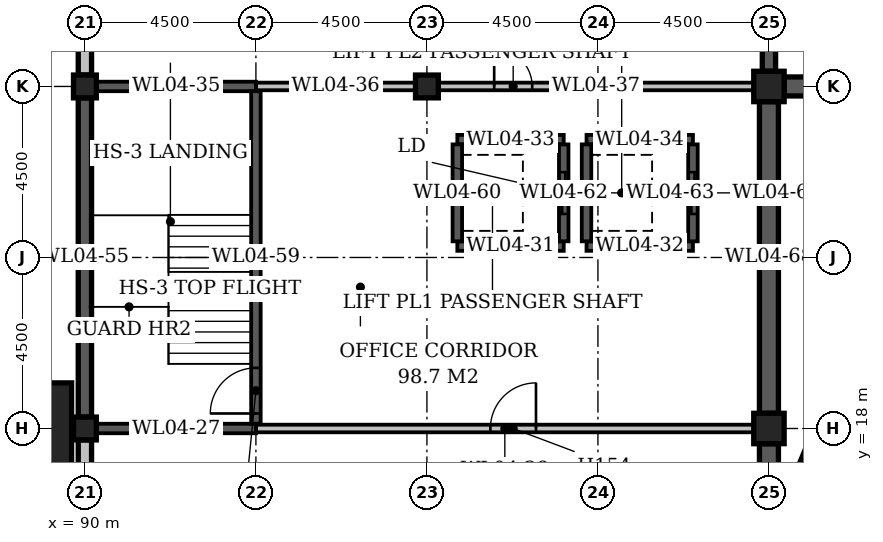
"""IFC4 building model, lengths in metres.
Left out: names, types, materials, properties, quantities, classifications, styles, units other than length and angle.
Written with IfcOpenShell. Run it as: python <this file> out.ifc"""

import sys

from ifc_helpers import new_model, si_unit, direction, frame, frame_2d, origin, origin_2d, place, context, subcontext, project, spatial, rectangle, extrude, element, fill, save


model = new_model("IFC4")
c1 = context("Model", 3, precision=1e-05, world=origin(), true_north=direction((0.0, 1.0)))
c2 = subcontext(c1, "Body", "Model", "MODEL_VIEW")
j1 = project(units=[si_unit("LENGTHUNIT", "METRE"), si_unit("PLANEANGLEUNIT", "RADIAN")], contexts=[c1])
p1 = place(None, origin())
s1 = spatial("IfcSite", under=j1, at=p1, CompositionType="ELEMENT")
p2 = place(p1, origin())
s2 = spatial("IfcBuilding", under=s1, at=p2, CompositionType="ELEMENT")
p3 = place(p2, frame((0.0, 0.0, 24.0)))
s3 = spatial("IfcBuildingStorey", under=s2, at=p3, CompositionType="ELEMENT", Elevation=24.0)
for number, where, z_axis, x_axis in (
    (1, (90.0, 18.0, 0.0), (0.0, 0.0, 1.0), (1.0, 0.0, 0.0)),
    (2, (90.0, 27.0, 0.0), (0.0, 0.0, 1.0), (1.0, 0.0, 0.0)),
    (3, (99.0, 27.0, 0.0), (0.0, 0.0, 1.0), (1.0, 0.0, 0.0)),
):
    element("IfcColumn", number, at=place(p3, frame(where, z_axis=z_axis, x_axis=x_axis)), inside=s3, PredefinedType="COLUMN", context=c2, shape_type="SweptSolid", body=[
        extrude(rectangle(XDim=0.6, YDim=0.6, at=origin_2d()), origin(), (0.0, 0.0, 1.0), 4.7),
    ])
for number, where, z_axis, x_axis in (
    (4, (108.0, 18.0, -0.3), (0.0, 0.0, 1.0), (1.0, 0.0, 0.0)),
    (5, (108.0, 27.0, -0.3), (0.0, 0.0, 1.0), (1.0, 0.0, 0.0)),
):
    element("IfcColumn", number, at=place(p3, frame(where, z_axis=z_axis, x_axis=x_axis)), inside=s3, PredefinedType="COLUMN", context=c2, shape_type="SweptSolid", body=[
        extrude(rectangle(XDim=0.8, YDim=0.8, at=origin_2d()), origin(), (0.0, 0.0, 1.0), 5.0),
    ])
p4 = place(p3, frame((90.3, 18.0, 0.0), z_axis=(0.0, 0.0, 1.0), x_axis=(1.0, 0.0, 0.0)))
e6 = element("IfcWall", 6, at=p4, inside=s3, PredefinedType="STANDARD", context=c2, shape_type="SweptSolid", body=[
    extrude(rectangle(XDim=4.2, YDim=0.25, at=frame_2d((2.1, 0.0))), origin(), (0.0, 0.0, 1.0), 4.7),
])
p5 = place(p3, frame((94.5, 18.0, 0.0), z_axis=(0.0, 0.0, 1.0), x_axis=(1.0, 0.0, 0.0)))
e7 = element("IfcWall", 7, at=p5, inside=s3, PredefinedType="STANDARD", context=c2, shape_type="SweptSolid", body=[
    extrude(rectangle(XDim=13.1, YDim=0.2, at=frame_2d((6.55, 0.0))), origin(), (0.0, 0.0, 1.0), 3.3),
])
p6 = place(p5, frame((6.17, 0.0, 0.0)))
e8 = element("IfcOpeningElement", 8, at=p6, cuts=e7, PredefinedType="OPENING", context=c2, shape_type="SweptSolid", body=[
    extrude(rectangle(XDim=1.2, YDim=2.1, at=frame_2d((0.6, 1.05))), frame((0.0, 0.112, 0.0), z_axis=(0.0, -1.0, 0.0), x_axis=(1.0, 0.0, 0.0)), (0.0, 0.0, 1.0), 0.224),
])
for number, where, z_axis, x_axis in (
    (9, (99.8, 22.8, 0.0), (0.0, 0.0, 1.0), (1.0, 0.0, 0.0)),
    (10, (103.2, 22.8, 0.0), (0.0, 0.0, 1.0), (1.0, 0.0, 0.0)),
    (11, (99.8, 25.6, 0.0), (0.0, 0.0, 1.0), (1.0, 0.0, 0.0)),
    (12, (103.2, 25.6, 0.0), (0.0, 0.0, 1.0), (1.0, 0.0, 0.0)),
):
    element("IfcWall", number, at=place(p3, frame(where, z_axis=z_axis, x_axis=x_axis)), inside=s3, PredefinedType="STANDARD", context=c2, shape_type="SweptSolid", body=[
        extrude(rectangle(XDim=2.8, YDim=0.25, at=frame_2d((1.4, 0.0))), origin(), (0.0, 0.0, 1.0), 4.7),
    ])
p7 = place(p3, frame((90.3, 27.0, 0.0), z_axis=(0.0, 0.0, 1.0), x_axis=(1.0, 0.0, 0.0)))
e13 = element("IfcWall", 13, at=p7, inside=s3, PredefinedType="STANDARD", context=c2, shape_type="SweptSolid", body=[
    extrude(rectangle(XDim=4.2, YDim=0.25, at=frame_2d((2.1, 0.0))), origin(), (0.0, 0.0, 1.0), 4.7),
])
p8 = place(p3, frame((94.5, 27.0, 0.0), z_axis=(0.0, 0.0, 1.0), x_axis=(1.0, 0.0, 0.0)))
e14 = element("IfcWall", 14, at=p8, inside=s3, PredefinedType="STANDARD", context=c2, shape_type="SweptSolid", body=[
    extrude(rectangle(XDim=4.2, YDim=0.2, at=frame_2d((2.1, 0.0))), origin(), (0.0, 0.0, 1.0), 4.7),
])
p9 = place(p3, frame((99.3, 27.0, 0.0), z_axis=(0.0, 0.0, 1.0), x_axis=(1.0, 0.0, 0.0)))
e15 = element("IfcWall", 15, at=p9, inside=s3, PredefinedType="STANDARD", context=c2, shape_type="SweptSolid", body=[
    extrude(rectangle(XDim=8.3, YDim=0.2, at=frame_2d((4.15, 0.0))), origin(), (0.0, 0.0, 1.0), 4.7),
])
p10 = place(p9, frame((1.47, 0.0, 0.0)))
e16 = element("IfcOpeningElement", 16, at=p10, cuts=e15, PredefinedType="OPENING", context=c2, shape_type="SweptSolid", body=[
    extrude(rectangle(XDim=1.0, YDim=2.1, at=frame_2d((0.5, 1.05))), frame((0.0, 0.112, 0.0), z_axis=(0.0, -1.0, 0.0), x_axis=(1.0, 0.0, 0.0)), (0.0, 0.0, 1.0), 0.224),
])
p11 = place(p3, frame((108.4, 27.0, 0.0), z_axis=(0.0, 0.0, 1.0), x_axis=(1.0, 0.0, 0.0)))
e17 = element("IfcWall", 17, at=p11, inside=s3, PredefinedType="STANDARD", context=c2, shape_type="SweptSolid", body=[
    extrude(rectangle(XDim=26.2, YDim=0.5, at=frame_2d((13.1, 0.0))), origin(), (0.0, 0.0, 1.0), 6.0),
])
p12 = place(p3, frame((90.0, 9.3, 0.0), z_axis=(0.0, 0.0, 1.0), x_axis=(0.0, 1.0, 0.0)))
e18 = element("IfcWall", 18, at=p12, inside=s3, PredefinedType="STANDARD", context=c2, shape_type="SweptSolid", body=[
    extrude(rectangle(XDim=8.4, YDim=0.35, at=frame_2d((4.2, 0.0))), origin(), (0.0, 0.0, 1.0), 4.1),
])
p13 = place(p12, frame((1.35, 0.0, 1.0)))
e19 = element("IfcOpeningElement", 19, at=p13, cuts=e18, PredefinedType="OPENING", context=c2, shape_type="SweptSolid", body=[
    extrude(rectangle(XDim=1.5, YDim=2.4, at=frame_2d((0.75, 1.2))), frame((0.0, 0.187, 0.0), z_axis=(0.0, -1.0, 0.0), x_axis=(1.0, 0.0, 0.0)), (0.0, 0.0, 1.0), 0.374),
])
p14 = place(p12, frame((5.55, 0.0, 1.0)))
e20 = element("IfcOpeningElement", 20, at=p14, cuts=e18, PredefinedType="OPENING", context=c2, shape_type="SweptSolid", body=[
    extrude(rectangle(XDim=1.5, YDim=2.4, at=frame_2d((0.75, 1.2))), frame((0.0, 0.187, 0.0), z_axis=(0.0, -1.0, 0.0), x_axis=(1.0, 0.0, 0.0)), (0.0, 0.0, 1.0), 0.374),
])
p15 = place(p3, frame((90.0, 18.3, 0.0), z_axis=(0.0, 0.0, 1.0), x_axis=(0.0, 1.0, 0.0)))
e21 = element("IfcWall", 21, at=p15, inside=s3, PredefinedType="STANDARD", context=c2, shape_type="SweptSolid", body=[
    extrude(rectangle(XDim=8.4, YDim=0.35, at=frame_2d((4.2, 0.0))), origin(), (0.0, 0.0, 1.0), 4.1),
])
p16 = place(p3, frame((90.0, 27.3, 0.0), z_axis=(0.0, 0.0, 1.0), x_axis=(0.0, 1.0, 0.0)))
e22 = element("IfcWall", 22, at=p16, inside=s3, PredefinedType="STANDARD", context=c2, shape_type="SweptSolid", body=[
    extrude(rectangle(XDim=8.4, YDim=0.35, at=frame_2d((4.2, 0.0))), origin(), (0.0, 0.0, 1.0), 4.1),
])
p17 = place(p16, frame((1.35, 0.0, 1.0)))
e23 = element("IfcOpeningElement", 23, at=p17, cuts=e22, PredefinedType="OPENING", context=c2, shape_type="SweptSolid", body=[
    extrude(rectangle(XDim=1.5, YDim=2.4, at=frame_2d((0.75, 1.2))), frame((0.0, 0.187, 0.0), z_axis=(0.0, -1.0, 0.0), x_axis=(1.0, 0.0, 0.0)), (0.0, 0.0, 1.0), 0.374),
])
p18 = place(p16, frame((5.55, 0.0, 1.0)))
e24 = element("IfcOpeningElement", 24, at=p18, cuts=e22, PredefinedType="OPENING", context=c2, shape_type="SweptSolid", body=[
    extrude(rectangle(XDim=1.5, YDim=2.4, at=frame_2d((0.75, 1.2))), frame((0.0, 0.187, 0.0), z_axis=(0.0, -1.0, 0.0), x_axis=(1.0, 0.0, 0.0)), (0.0, 0.0, 1.0), 0.374),
])
p19 = place(p3, frame((94.5, 18.125, 0.0), z_axis=(0.0, 0.0, 1.0), x_axis=(0.0, 1.0, 0.0)))
e25 = element("IfcWall", 25, at=p19, inside=s3, PredefinedType="STANDARD", context=c2, shape_type="SweptSolid", body=[
    extrude(rectangle(XDim=8.75, YDim=0.25, at=frame_2d((4.375, 0.0))), origin(), (0.0, 0.0, 1.0), 4.7),
])
p20 = place(p19, frame((0.27, 0.0, 0.0)))
e26 = element("IfcOpeningElement", 26, at=p20, cuts=e25, PredefinedType="OPENING", context=c2, shape_type="SweptSolid", body=[
    extrude(rectangle(XDim=1.2, YDim=2.1, at=frame_2d((0.6, 1.05))), frame((0.0, 0.137, 0.0), z_axis=(0.0, -1.0, 0.0), x_axis=(1.0, 0.0, 0.0)), (0.0, 0.0, 1.0), 0.274),
])
p21 = place(p3, frame((99.8, 22.925, 0.0), z_axis=(0.0, 0.0, 1.0), x_axis=(0.0, 1.0, 0.0)))
e27 = element("IfcWall", 27, at=p21, inside=s3, PredefinedType="STANDARD", context=c2, shape_type="SweptSolid", body=[
    extrude(rectangle(XDim=2.55, YDim=0.25, at=frame_2d((1.275, 0.0))), origin(), (0.0, 0.0, 1.0), 4.7),
])
p22 = place(p3, frame((102.6, 22.925, 0.0), z_axis=(0.0, 0.0, 1.0), x_axis=(0.0, 1.0, 0.0)))
e28 = element("IfcWall", 28, at=p22, inside=s3, PredefinedType="STANDARD", context=c2, shape_type="SweptSolid", body=[
    extrude(rectangle(XDim=2.55, YDim=0.25, at=frame_2d((1.275, 0.0))), origin(), (0.0, 0.0, 1.0), 4.7),
])
p23 = place(p22, frame((0.72, 0.0, 0.0)))
e29 = element("IfcOpeningElement", 29, at=p23, cuts=e28, PredefinedType="OPENING", context=c2, shape_type="SweptSolid", body=[
    extrude(rectangle(XDim=1.1, YDim=2.1, at=frame_2d((0.55, 1.05))), frame((0.0, 0.137, 0.0), z_axis=(0.0, -1.0, 0.0), x_axis=(1.0, 0.0, 0.0)), (0.0, 0.0, 1.0), 0.274),
])
p24 = place(p3, frame((103.2, 22.925, 0.0), z_axis=(0.0, 0.0, 1.0), x_axis=(0.0, 1.0, 0.0)))
e30 = element("IfcWall", 30, at=p24, inside=s3, PredefinedType="STANDARD", context=c2, shape_type="SweptSolid", body=[
    extrude(rectangle(XDim=2.55, YDim=0.25, at=frame_2d((1.275, 0.0))), origin(), (0.0, 0.0, 1.0), 4.7),
])
p25 = place(p3, frame((106.0, 22.925, 0.0), z_axis=(0.0, 0.0, 1.0), x_axis=(0.0, 1.0, 0.0)))
e31 = element("IfcWall", 31, at=p25, inside=s3, PredefinedType="STANDARD", context=c2, shape_type="SweptSolid", body=[
    extrude(rectangle(XDim=2.55, YDim=0.25, at=frame_2d((1.275, 0.0))), origin(), (0.0, 0.0, 1.0), 4.7),
])
p26 = place(p25, frame((0.72, 0.0, 0.0)))
e32 = element("IfcOpeningElement", 32, at=p26, cuts=e31, PredefinedType="OPENING", context=c2, shape_type="SweptSolid", body=[
    extrude(rectangle(XDim=1.1, YDim=2.1, at=frame_2d((0.55, 1.05))), frame((0.0, 0.137, 0.0), z_axis=(0.0, -1.0, 0.0), x_axis=(1.0, 0.0, 0.0)), (0.0, 0.0, 1.0), 0.274),
])
for number, where, z_axis, x_axis in (
    (33, (108.0, 9.4, 0.0), (0.0, 0.0, 1.0), (0.0, 1.0, 0.0)),
    (34, (108.0, 18.4, 0.0), (0.0, 0.0, 1.0), (0.0, 1.0, 0.0)),
):
    element("IfcWall", number, at=place(p3, frame(where, z_axis=z_axis, x_axis=x_axis)), inside=s3, PredefinedType="STANDARD", context=c2, shape_type="SweptSolid", body=[
        extrude(rectangle(XDim=8.2, YDim=0.5, at=frame_2d((4.1, 0.0))), origin(), (0.0, 0.0, 1.0), 4.7),
    ])
p27 = place(p3, frame((108.0, 27.4, 0.0), z_axis=(0.0, 0.0, 1.0), x_axis=(0.0, 1.0, 0.0)))
e35 = element("IfcWall", 35, at=p27, inside=s3, PredefinedType="STANDARD", context=c2, shape_type="SweptSolid", body=[
    extrude(rectangle(XDim=8.3, YDim=0.35, at=frame_2d((4.15, 0.0))), origin(), (0.0, 0.0, 1.0), 6.0),
])
p28 = place(p3, frame((110.304, 19.919, 0.5), z_axis=(0.0, 0.0, 1.0), x_axis=(-0.382681538037, -0.923880317165, 0.0)))
e36 = element("IfcWall", 36, at=p28, inside=s3, PredefinedType="STANDARD", context=c2, shape_type="SweptSolid", body=[
    extrude(rectangle(XDim=3.291, YDim=0.6, at=frame_2d((1.646, 0.0))), origin(), (0.0, 0.0, 1.0), 0.9),
])
p29 = place(p3, frame((110.312, 19.937, 1.4), z_axis=(0.0, 0.0, 1.0), x_axis=(-0.382673300321, -0.923883729276, 0.0)))
e37 = element("IfcWall", 37, at=p29, inside=s3, PredefinedType="STANDARD", context=c2, shape_type="SweptSolid", body=[
    extrude(rectangle(XDim=3.331, YDim=0.3, at=frame_2d((1.666, 0.0))), origin(), (0.0, 0.0, 1.0), 3.0),
])
p30 = place(p29, frame((0.965, 0.0, 0.8)))
e38 = element("IfcOpeningElement", 38, at=p30, cuts=e37, PredefinedType="OPENING", context=c2, shape_type="SweptSolid", body=[
    extrude(rectangle(XDim=1.4, YDim=1.6, at=frame_2d((0.7, 0.8))), frame((0.0, 0.162, 0.0), z_axis=(0.0, -1.0, 0.0), x_axis=(1.0, 0.0, 0.0)), (0.0, 0.0, 1.0), 0.324),
])
p31 = place(p3, frame((88.85, 18.0, 0.0), z_axis=(0.0, 0.0, 1.0), x_axis=(1.0, 0.0, 0.0)))
e39 = element("IfcColumn", 39, at=p31, inside=s3, PredefinedType="COLUMN", context=c2, shape_type="SweptSolid", body=[
    extrude(rectangle(XDim=1.6, YDim=2.4, at=origin_2d()), origin(), (0.0, 0.0, 1.0), 2.0),
])
p32 = place(p3, frame((89.95, -8.925, 5.0), z_axis=(0.0, 0.0, 1.0), x_axis=(0.0, 1.0, 0.0)))
e40 = element("IfcWall", 40, at=p32, inside=s3, PredefinedType="STANDARD", context=c2, shape_type="SweptSolid", body=[
    extrude(rectangle(XDim=53.85, YDim=0.25, at=frame_2d((26.925, 0.0))), origin(), (0.0, 0.0, 1.0), 1.1),
])
p33 = place(p6, frame((1.2, 0.0, 0.0), z_axis=(0.0, 0.0, 1.0), x_axis=(-1.0, 0.0, 0.0)))
e41 = element("IfcDoor", 41, at=p33, inside=s3, OperationType="SINGLE_SWING_LEFT", PredefinedType="DOOR", context=c2, shape_type="SweptSolid", body=[
    extrude(rectangle(XDim=1.2, YDim=2.1, at=frame_2d((0.6, 1.05))), frame((0.0, 0.025, 0.0), z_axis=(0.0, -1.0, 0.0), x_axis=(1.0, 0.0, 0.0)), (0.0, 0.0, 1.0), 0.05),
])
fill(e8, e41)
p34 = place(p20, origin())
e42 = element("IfcDoor", 42, at=p34, inside=s3, OperationType="SINGLE_SWING_LEFT", PredefinedType="DOOR", context=c2, shape_type="SweptSolid", body=[
    extrude(rectangle(XDim=1.2, YDim=2.1, at=frame_2d((0.6, 1.05))), frame((0.0, 0.025, 0.0), z_axis=(0.0, -1.0, 0.0), x_axis=(1.0, 0.0, 0.0)), (0.0, 0.0, 1.0), 0.05),
])
fill(e26, e42)
p35 = place(p10, origin())
e43 = element("IfcDoor", 43, at=p35, inside=s3, OperationType="SINGLE_SWING_LEFT", PredefinedType="DOOR", context=c2, shape_type="SweptSolid", body=[
    extrude(rectangle(XDim=1.0, YDim=2.1, at=frame_2d((0.5, 1.05))), frame((0.0, 0.025, 0.0), z_axis=(0.0, -1.0, 0.0), x_axis=(1.0, 0.0, 0.0)), (0.0, 0.0, 1.0), 0.05),
])
fill(e16, e43)
p36 = place(p23, origin())
e44 = element("IfcDoor", 44, at=p36, inside=s3, OperationType="SLIDING_TO_LEFT", PredefinedType="DOOR", context=c2, shape_type="SweptSolid", body=[
    extrude(rectangle(XDim=1.1, YDim=2.1, at=frame_2d((0.55, 1.05))), frame((0.0, 0.025, 0.0), z_axis=(0.0, -1.0, 0.0), x_axis=(1.0, 0.0, 0.0)), (0.0, 0.0, 1.0), 0.05),
])
fill(e29, e44)
p37 = place(p26, origin())
e45 = element("IfcDoor", 45, at=p37, inside=s3, OperationType="SLIDING_TO_LEFT", PredefinedType="DOOR", context=c2, shape_type="SweptSolid", body=[
    extrude(rectangle(XDim=1.1, YDim=2.1, at=frame_2d((0.55, 1.05))), frame((0.0, 0.025, 0.0), z_axis=(0.0, -1.0, 0.0), x_axis=(1.0, 0.0, 0.0)), (0.0, 0.0, 1.0), 0.05),
])
fill(e32, e45)
save(model, sys.argv[1])
